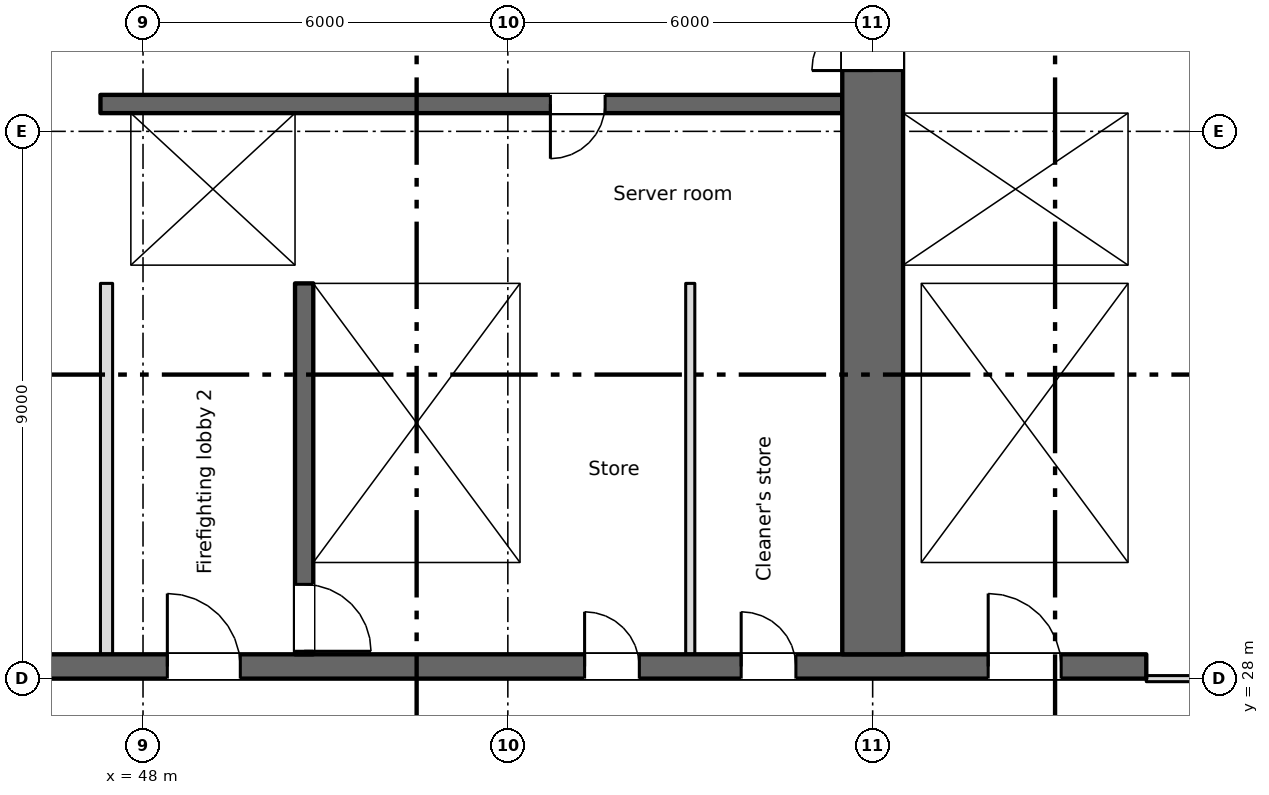
"""IFC4 building model, lengths in metres.
Left out: names, types, materials, properties, quantities, classifications, styles, units other than length and angle.
Written with IfcOpenShell. Run it as: python <this file> out.ifc"""

import sys

from ifc_helpers import new_model, si_unit, direction, frame, frame_2d, origin, place, context, subcontext, project, spatial, rectangle, extrude, element, fill, save


model = new_model("IFC4")
c1 = context("Model", 3, precision=1e-05, world=origin(), true_north=direction((0.0, 1.0)))
c2 = subcontext(c1, "Body", "Model", "MODEL_VIEW")
j1 = project(units=[si_unit("LENGTHUNIT", "METRE"), si_unit("PLANEANGLEUNIT", "RADIAN")], contexts=[c1])
p1 = place(None, origin())
s1 = spatial("IfcSite", under=j1, at=p1, CompositionType="ELEMENT")
p2 = place(p1, origin())
s2 = spatial("IfcBuilding", under=s1, at=p2, CompositionType="ELEMENT")
p3 = place(p2, frame((0.0, 0.0, 56.25)))
s3 = spatial("IfcBuildingStorey", under=s2, at=p3, CompositionType="ELEMENT", Elevation=56.25)
p4 = place(p3, frame((6.7, 28.2, 0.0), z_axis=(0.0, 0.0, 1.0), x_axis=(1.0, 0.0, 0.0)))
e1 = element("IfcWall", 1, at=p4, inside=s3, PredefinedType="SHEAR", context=c2, shape_type="SweptSolid", body=[
    extrude(rectangle(XDim=57.8, YDim=0.4, at=frame_2d((28.9, 0.0))), origin(), (0.0, 0.0, 1.0), 3.35),
])
p5 = place(p4, frame((13.85, 0.0, 0.0)))
e2 = element("IfcOpeningElement", 2, at=p5, cuts=e1, PredefinedType="OPENING", context=c2, shape_type="SweptSolid", body=[
    extrude(rectangle(XDim=0.9, YDim=2.1, at=frame_2d((0.45, 1.05))), frame((0.0, 0.21, 0.0), z_axis=(0.0, -1.0, 0.0), x_axis=(1.0, 0.0, 0.0)), (0.0, 0.0, 1.0), 0.42),
])
p6 = place(p4, frame((48.562, 0.0, 0.0)))
e3 = element("IfcOpeningElement", 3, at=p6, cuts=e1, PredefinedType="OPENING", context=c2, shape_type="SweptSolid", body=[
    extrude(rectangle(XDim=0.9, YDim=2.1, at=frame_2d((0.45, 1.05))), frame((0.0, 0.21, 0.0), z_axis=(0.0, -1.0, 0.0), x_axis=(1.0, 0.0, 0.0)), (0.0, 0.0, 1.0), 0.42),
])
p7 = place(p4, frame((51.137, 0.0, 0.0)))
e4 = element("IfcOpeningElement", 4, at=p7, cuts=e1, PredefinedType="OPENING", context=c2, shape_type="SweptSolid", body=[
    extrude(rectangle(XDim=0.9, YDim=2.1, at=frame_2d((0.45, 1.05))), frame((0.0, 0.21, 0.0), z_axis=(0.0, -1.0, 0.0), x_axis=(1.0, 0.0, 0.0)), (0.0, 0.0, 1.0), 0.42),
])
p8 = place(p4, frame((1.35, 0.0, 0.0)))
e5 = element("IfcOpeningElement", 5, at=p8, cuts=e1, PredefinedType="OPENING", context=c2, shape_type="SweptSolid", body=[
    extrude(rectangle(XDim=0.9, YDim=2.1, at=frame_2d((0.45, 1.05))), frame((0.0, 0.21, 0.0), z_axis=(0.0, -1.0, 0.0), x_axis=(1.0, 0.0, 0.0)), (0.0, 0.0, 1.0), 0.42),
])
p9 = place(p4, frame((4.7, 0.0, 0.0)))
e6 = element("IfcOpeningElement", 6, at=p9, cuts=e1, PredefinedType="OPENING", context=c2, shape_type="SweptSolid", body=[
    extrude(rectangle(XDim=1.2, YDim=2.1, at=frame_2d((0.6, 1.05))), frame((0.0, 0.21, 0.0), z_axis=(0.0, -1.0, 0.0), x_axis=(1.0, 0.0, 0.0)), (0.0, 0.0, 1.0), 0.42),
])
p10 = place(p4, frame((31.7, 0.0, 0.0)))
e7 = element("IfcOpeningElement", 7, at=p10, cuts=e1, PredefinedType="OPENING", context=c2, shape_type="SweptSolid", body=[
    extrude(rectangle(XDim=1.2, YDim=2.1, at=frame_2d((0.6, 1.05))), frame((0.0, 0.21, 0.0), z_axis=(0.0, -1.0, 0.0), x_axis=(1.0, 0.0, 0.0)), (0.0, 0.0, 1.0), 0.42),
])
p11 = place(p4, frame((55.2, 0.0, 0.0)))
e8 = element("IfcOpeningElement", 8, at=p11, cuts=e1, PredefinedType="OPENING", context=c2, shape_type="SweptSolid", body=[
    extrude(rectangle(XDim=1.2, YDim=2.1, at=frame_2d((0.6, 1.05))), frame((0.0, 0.21, 0.0), z_axis=(0.0, -1.0, 0.0), x_axis=(1.0, 0.0, 0.0)), (0.0, 0.0, 1.0), 0.42),
])
p12 = place(p4, frame((21.7, 0.0, 0.0)))
e9 = element("IfcOpeningElement", 9, at=p12, cuts=e1, PredefinedType="OPENING", context=c2, shape_type="SweptSolid", body=[
    extrude(rectangle(XDim=1.2, YDim=2.1, at=frame_2d((0.6, 1.05))), frame((0.0, 0.21, 0.0), z_axis=(0.0, -1.0, 0.0), x_axis=(1.0, 0.0, 0.0)), (0.0, 0.0, 1.0), 0.42),
])
p13 = place(p4, frame((41.7, 0.0, 0.0)))
e10 = element("IfcOpeningElement", 10, at=p13, cuts=e1, PredefinedType="OPENING", context=c2, shape_type="SweptSolid", body=[
    extrude(rectangle(XDim=1.2, YDim=2.1, at=frame_2d((0.6, 1.05))), frame((0.0, 0.21, 0.0), z_axis=(0.0, -1.0, 0.0), x_axis=(1.0, 0.0, 0.0)), (0.0, 0.0, 1.0), 0.42),
])
p14 = place(p4, frame((24.85, 0.0, 0.0)))
e11 = element("IfcOpeningElement", 11, at=p14, cuts=e1, PredefinedType="OPENING", context=c2, shape_type="SweptSolid", body=[
    extrude(rectangle(XDim=2.4, YDim=2.1, at=frame_2d((1.2, 1.05))), frame((0.0, 0.21, 0.0), z_axis=(0.0, -1.0, 0.0), x_axis=(1.0, 0.0, 0.0)), (0.0, 0.0, 1.0), 0.42),
])
p15 = place(p4, frame((37.35, 0.0, 0.0)))
e12 = element("IfcOpeningElement", 12, at=p15, cuts=e1, PredefinedType="OPENING", context=c2, shape_type="SweptSolid", body=[
    extrude(rectangle(XDim=2.4, YDim=2.1, at=frame_2d((1.2, 1.05))), frame((0.0, 0.21, 0.0), z_axis=(0.0, -1.0, 0.0), x_axis=(1.0, 0.0, 0.0)), (0.0, 0.0, 1.0), 0.42),
])
p16 = place(p4, frame((7.85, 0.0, 0.0)))
e13 = element("IfcOpeningElement", 13, at=p16, cuts=e1, PredefinedType="OPENING", context=c2, shape_type="SweptSolid", body=[
    extrude(rectangle(XDim=2.4, YDim=2.1, at=frame_2d((1.2, 1.05))), frame((0.0, 0.21, 0.0), z_axis=(0.0, -1.0, 0.0), x_axis=(1.0, 0.0, 0.0)), (0.0, 0.0, 1.0), 0.42),
])
p17 = place(p4, frame((28.85, 0.0, 0.0)))
e14 = element("IfcOpeningElement", 14, at=p17, cuts=e1, PredefinedType="OPENING", context=c2, shape_type="SweptSolid", body=[
    extrude(rectangle(XDim=0.9, YDim=2.1, at=frame_2d((0.45, 1.05))), frame((0.0, 0.21, 0.0), z_axis=(0.0, -1.0, 0.0), x_axis=(1.0, 0.0, 0.0)), (0.0, 0.0, 1.0), 0.42),
])
p18 = place(p4, frame((34.85, 0.0, 0.0)))
e15 = element("IfcOpeningElement", 15, at=p18, cuts=e1, PredefinedType="OPENING", context=c2, shape_type="SweptSolid", body=[
    extrude(rectangle(XDim=0.9, YDim=2.1, at=frame_2d((0.45, 1.05))), frame((0.0, 0.21, 0.0), z_axis=(0.0, -1.0, 0.0), x_axis=(1.0, 0.0, 0.0)), (0.0, 0.0, 1.0), 0.42),
])
p19 = place(p3, frame((64.35, 34.8, 0.0), z_axis=(0.0, 0.0, 1.0), x_axis=(0.0, 1.0, 0.0)))
e16 = element("IfcWall", 16, at=p19, inside=s3, PredefinedType="SHEAR", context=c2, shape_type="SweptSolid", body=[
    extrude(rectangle(XDim=10.2, YDim=0.3, at=frame_2d((5.1, 0.0))), origin(), (0.0, 0.0, 1.0), 3.35),
])
p20 = place(p3, frame((60.0, 28.4, 0.0), z_axis=(0.0, 0.0, 1.0), x_axis=(0.0, 1.0, 0.0)))
e17 = element("IfcWall", 17, at=p20, inside=s3, PredefinedType="SHEAR", context=c2, shape_type="SweptSolid", body=[
    extrude(rectangle(XDim=16.6, YDim=1.0, at=frame_2d((8.3, 0.0))), origin(), (0.0, 0.0, 1.0), 3.35),
])
p21 = place(p20, frame((9.6, 0.0, 0.0)))
e18 = element("IfcOpeningElement", 18, at=p21, cuts=e17, PredefinedType="OPENING", context=c2, shape_type="SweptSolid", body=[
    extrude(rectangle(XDim=2.0, YDim=2.1, at=frame_2d((1.0, 1.05))), frame((0.0, 0.51, 0.0), z_axis=(0.0, -1.0, 0.0), x_axis=(1.0, 0.0, 0.0)), (0.0, 0.0, 1.0), 1.02),
])
p22 = place(p20, frame((15.25, 0.0, 0.0)))
e19 = element("IfcOpeningElement", 19, at=p22, cuts=e17, PredefinedType="OPENING", context=c2, shape_type="SweptSolid", body=[
    extrude(rectangle(XDim=1.2, YDim=2.1, at=frame_2d((0.6, 1.05))), frame((0.0, 0.51, 0.0), z_axis=(0.0, -1.0, 0.0), x_axis=(1.0, 0.0, 0.0)), (0.0, 0.0, 1.0), 1.02),
])
p23 = place(p3, frame((50.65, 34.5, 0.0), z_axis=(0.0, 0.0, 1.0), x_axis=(0.0, -1.0, 0.0)))
e20 = element("IfcWall", 20, at=p23, inside=s3, PredefinedType="SHEAR", context=c2, shape_type="SweptSolid", body=[
    extrude(rectangle(XDim=6.1, YDim=0.3, at=frame_2d((3.05, 0.0))), origin(), (0.0, 0.0, 1.0), 3.35),
])
p24 = place(p23, frame((4.95, 0.0, 0.0)))
e21 = element("IfcOpeningElement", 21, at=p24, cuts=e20, PredefinedType="OPENING", context=c2, shape_type="SweptSolid", body=[
    extrude(rectangle(XDim=1.1, YDim=2.1, at=frame_2d((0.55, 1.05))), frame((0.0, 0.16, 0.0), z_axis=(0.0, -1.0, 0.0), x_axis=(1.0, 0.0, 0.0)), (0.0, 0.0, 1.0), 0.32),
])
for number, where, z_axis, x_axis in (
    (22, (54.35, 28.4, 0.0), (0.0, 0.0, 1.0), (0.0, 1.0, 0.0)),
    (23, (60.65, 28.4, 0.0), (0.0, 0.0, 1.0), (0.0, 1.0, 0.0)),
    (24, (64.35, 28.4, 0.0), (0.0, 0.0, 1.0), (0.0, 1.0, 0.0)),
):
    element("IfcWall", number, at=place(p3, frame(where, z_axis=z_axis, x_axis=x_axis)), inside=s3, PredefinedType="SHEAR", context=c2, shape_type="SweptSolid", body=[
        extrude(rectangle(XDim=6.1, YDim=0.3, at=frame_2d((3.05, 0.0))), origin(), (0.0, 0.0, 1.0), 3.35),
    ])
p25 = place(p3, frame((47.3, 34.65, 0.0), z_axis=(0.0, 0.0, 1.0), x_axis=(1.0, 0.0, 0.0)))
e25 = element("IfcWall", 25, at=p25, inside=s3, PredefinedType="SHEAR", context=c2, shape_type="SweptSolid", body=[
    extrude(rectangle(XDim=12.2, YDim=0.3, at=frame_2d((6.1, 0.0))), origin(), (0.0, 0.0, 1.0), 3.35),
])
p26 = place(p25, frame((1.3, 0.0, 0.0)))
e26 = element("IfcOpeningElement", 26, at=p26, cuts=e25, PredefinedType="OPENING", context=c2, shape_type="SweptSolid", body=[
    extrude(rectangle(XDim=1.1, YDim=2.1, at=frame_2d((0.55, 1.05))), frame((0.0, 0.16, 0.0), z_axis=(0.0, -1.0, 0.0), x_axis=(1.0, 0.0, 0.0)), (0.0, 0.0, 1.0), 0.32),
])
p27 = place(p3, frame((60.5, 34.65, 0.0), z_axis=(0.0, 0.0, 1.0), x_axis=(1.0, 0.0, 0.0)))
e27 = element("IfcWall", 27, at=p27, inside=s3, PredefinedType="SHEAR", context=c2, shape_type="SweptSolid", body=[
    extrude(rectangle(XDim=4.0, YDim=0.3, at=frame_2d((2.0, 0.0))), origin(), (0.0, 0.0, 1.0), 3.35),
])
p28 = place(p3, frame((59.5, 37.45, 0.0), z_axis=(0.0, 0.0, 1.0), x_axis=(-1.0, 0.0, 0.0)))
e28 = element("IfcWall", 28, at=p28, inside=s3, PredefinedType="SHEAR", context=c2, shape_type="SweptSolid", body=[
    extrude(rectangle(XDim=12.2, YDim=0.3, at=frame_2d((6.1, 0.0))), origin(), (0.0, 0.0, 1.0), 3.35),
])
p29 = place(p28, frame((3.9, 0.0, 0.0)))
e29 = element("IfcOpeningElement", 29, at=p29, cuts=e28, PredefinedType="OPENING", context=c2, shape_type="SweptSolid", body=[
    extrude(rectangle(XDim=0.9, YDim=2.1, at=frame_2d((0.45, 1.05))), frame((0.0, 0.16, 0.0), z_axis=(0.0, -1.0, 0.0), x_axis=(1.0, 0.0, 0.0)), (0.0, 0.0, 1.0), 0.32),
])
p30 = place(p3, frame((60.5, 37.45, 0.0), z_axis=(0.0, 0.0, 1.0), x_axis=(1.0, 0.0, 0.0)))
e30 = element("IfcWall", 30, at=p30, inside=s3, PredefinedType="SHEAR", context=c2, shape_type="SweptSolid", body=[
    extrude(rectangle(XDim=3.7, YDim=0.3, at=frame_2d((1.85, 0.0))), origin(), (0.0, 0.0, 1.0), 3.35),
])
p31 = place(p30, frame((1.3, 0.0, 0.0)))
e31 = element("IfcOpeningElement", 31, at=p31, cuts=e30, PredefinedType="OPENING", context=c2, shape_type="SweptSolid", body=[
    extrude(rectangle(XDim=1.1, YDim=2.1, at=frame_2d((0.55, 1.05))), frame((0.0, 0.16, 0.0), z_axis=(0.0, -1.0, 0.0), x_axis=(1.0, 0.0, 0.0)), (0.0, 0.0, 1.0), 0.32),
])
p32 = place(p3, frame((47.55, 34.8, 0.0), z_axis=(0.0, 0.0, 1.0), x_axis=(0.0, 1.0, 0.0)))
e32 = element("IfcWall", 32, at=p32, inside=s3, PredefinedType="SHEAR", context=c2, shape_type="SweptSolid", body=[
    extrude(rectangle(XDim=2.5, YDim=0.5, at=frame_2d((1.25, 0.0))), origin(), (0.0, 0.0, 1.0), 3.35),
])
p33 = place(p3, frame((50.65, 34.8, 0.0), z_axis=(0.0, 0.0, 1.0), x_axis=(0.0, 1.0, 0.0)))
e33 = element("IfcWall", 33, at=p33, inside=s3, PredefinedType="SHEAR", context=c2, shape_type="SweptSolid", body=[
    extrude(rectangle(XDim=2.5, YDim=0.3, at=frame_2d((1.25, 0.0))), origin(), (0.0, 0.0, 1.0), 3.35),
])
p34 = place(p3, frame((47.4, 28.4, 0.0), z_axis=(0.0, 0.0, 1.0), x_axis=(0.0, 1.0, 0.0)))
e34 = element("IfcWall", 34, at=p34, inside=s3, PredefinedType="PARTITIONING", context=c2, shape_type="SweptSolid", body=[
    extrude(rectangle(XDim=6.1, YDim=0.2, at=frame_2d((3.05, 0.0))), origin(), (0.0, 0.0, 1.0), 3.35),
])
p35 = place(p3, frame((57.0, 28.4, 0.0), z_axis=(0.0, 0.0, 1.0), x_axis=(0.0, 1.0, 0.0)))
e35 = element("IfcWall", 35, at=p35, inside=s3, PredefinedType="PARTITIONING", context=c2, shape_type="SweptSolid", body=[
    extrude(rectangle(XDim=6.1, YDim=0.15, at=frame_2d((3.05, 0.0))), origin(), (0.0, 0.0, 1.0), 3.35),
])
p36 = place(p3, frame((64.5, 28.0, 0.0), z_axis=(0.0, 0.0, 1.0), x_axis=(1.0, 0.0, 0.0)))
e36 = element("IfcWall", 36, at=p36, inside=s3, PredefinedType="PARTITIONING", context=c2, shape_type="SweptSolid", body=[
    extrude(rectangle(XDim=12.7, YDim=0.1, at=frame_2d((6.35, 0.0))), origin(), (0.0, 0.0, 1.0), 3.35),
])
p37 = place(p36, frame((2.575, 0.0, 0.0)))
e37 = element("IfcOpeningElement", 37, at=p37, cuts=e36, PredefinedType="OPENING", context=c2, shape_type="SweptSolid", body=[
    extrude(rectangle(XDim=1.2, YDim=2.1, at=frame_2d((0.6, 1.05))), frame((0.0, 0.06, 0.0), z_axis=(0.0, -1.0, 0.0), x_axis=(1.0, 0.0, 0.0)), (0.0, 0.0, 1.0), 0.12),
])
p38 = place(p36, frame((8.925, 0.0, 0.0)))
e38 = element("IfcOpeningElement", 38, at=p38, cuts=e36, PredefinedType="OPENING", context=c2, shape_type="SweptSolid", body=[
    extrude(rectangle(XDim=1.2, YDim=2.1, at=frame_2d((0.6, 1.05))), frame((0.0, 0.06, 0.0), z_axis=(0.0, -1.0, 0.0), x_axis=(1.0, 0.0, 0.0)), (0.0, 0.0, 1.0), 0.12),
])
p39 = place(p6, origin())
e39 = element("IfcDoor", 39, at=p39, inside=s3, OperationType="SINGLE_SWING_LEFT", PredefinedType="DOOR", context=c2, shape_type="SweptSolid", body=[
    extrude(rectangle(XDim=0.9, YDim=2.1, at=frame_2d((0.45, 1.05))), frame((0.0, 0.025, 0.0), z_axis=(0.0, -1.0, 0.0), x_axis=(1.0, 0.0, 0.0)), (0.0, 0.0, 1.0), 0.05),
])
fill(e3, e39)
p40 = place(p7, origin())
e40 = element("IfcDoor", 40, at=p40, inside=s3, OperationType="SINGLE_SWING_LEFT", PredefinedType="DOOR", context=c2, shape_type="SweptSolid", body=[
    extrude(rectangle(XDim=0.9, YDim=2.1, at=frame_2d((0.45, 1.05))), frame((0.0, 0.025, 0.0), z_axis=(0.0, -1.0, 0.0), x_axis=(1.0, 0.0, 0.0)), (0.0, 0.0, 1.0), 0.05),
])
fill(e4, e40)
p41 = place(p29, origin())
e41 = element("IfcDoor", 41, at=p41, inside=s3, OperationType="SINGLE_SWING_RIGHT", PredefinedType="DOOR", context=c2, shape_type="SweptSolid", body=[
    extrude(rectangle(XDim=0.9, YDim=2.1, at=frame_2d((0.45, 1.05))), frame((0.0, 0.025, 0.0), z_axis=(0.0, -1.0, 0.0), x_axis=(1.0, 0.0, 0.0)), (0.0, 0.0, 1.0), 0.05),
])
fill(e29, e41)
p42 = place(p31, origin())
e42 = element("IfcDoor", 42, at=p42, inside=s3, OperationType="SLIDING_TO_LEFT", PredefinedType="DOOR", context=c2, shape_type="SweptSolid", body=[
    extrude(rectangle(XDim=1.1, YDim=2.1, at=frame_2d((0.55, 1.05))), frame((0.0, 0.025, 0.0), z_axis=(0.0, -1.0, 0.0), x_axis=(1.0, 0.0, 0.0)), (0.0, 0.0, 1.0), 0.05),
])
fill(e31, e42)
p43 = place(p26, origin())
e43 = element("IfcDoor", 43, at=p43, inside=s3, OperationType="SLIDING_TO_LEFT", PredefinedType="DOOR", context=c2, shape_type="SweptSolid", body=[
    extrude(rectangle(XDim=1.1, YDim=2.1, at=frame_2d((0.55, 1.05))), frame((0.0, 0.025, 0.0), z_axis=(0.0, -1.0, 0.0), x_axis=(1.0, 0.0, 0.0)), (0.0, 0.0, 1.0), 0.05),
])
fill(e26, e43)
p44 = place(p24, origin())
e44 = element("IfcDoor", 44, at=p44, inside=s3, OperationType="SINGLE_SWING_RIGHT", PredefinedType="DOOR", context=c2, shape_type="SweptSolid", body=[
    extrude(rectangle(XDim=1.1, YDim=2.1, at=frame_2d((0.55, 1.05))), frame((0.0, 0.025, 0.0), z_axis=(0.0, -1.0, 0.0), x_axis=(1.0, 0.0, 0.0)), (0.0, 0.0, 1.0), 0.05),
])
fill(e21, e44)
p45 = place(p11, origin())
e45 = element("IfcDoor", 45, at=p45, inside=s3, OperationType="SINGLE_SWING_LEFT", PredefinedType="DOOR", context=c2, shape_type="SweptSolid", body=[
    extrude(rectangle(XDim=1.2, YDim=2.1, at=frame_2d((0.6, 1.05))), frame((0.0, 0.025, 0.0), z_axis=(0.0, -1.0, 0.0), x_axis=(1.0, 0.0, 0.0)), (0.0, 0.0, 1.0), 0.05),
])
fill(e8, e45)
p46 = place(p13, origin())
e46 = element("IfcDoor", 46, at=p46, inside=s3, OperationType="SINGLE_SWING_LEFT", PredefinedType="DOOR", context=c2, shape_type="SweptSolid", body=[
    extrude(rectangle(XDim=1.2, YDim=2.1, at=frame_2d((0.6, 1.05))), frame((0.0, 0.025, 0.0), z_axis=(0.0, -1.0, 0.0), x_axis=(1.0, 0.0, 0.0)), (0.0, 0.0, 1.0), 0.05),
])
fill(e10, e46)
p47 = place(p21, origin())
e47 = element("IfcDoor", 47, at=p47, inside=s3, OperationType="DOUBLE_DOOR_SINGLE_SWING", PredefinedType="DOOR", context=c2, shape_type="SweptSolid", body=[
    extrude(rectangle(XDim=2.0, YDim=2.1, at=frame_2d((1.0, 1.05))), frame((0.0, 0.025, 0.0), z_axis=(0.0, -1.0, 0.0), x_axis=(1.0, 0.0, 0.0)), (0.0, 0.0, 1.0), 0.05),
])
fill(e18, e47)
save(model, sys.argv[1])
